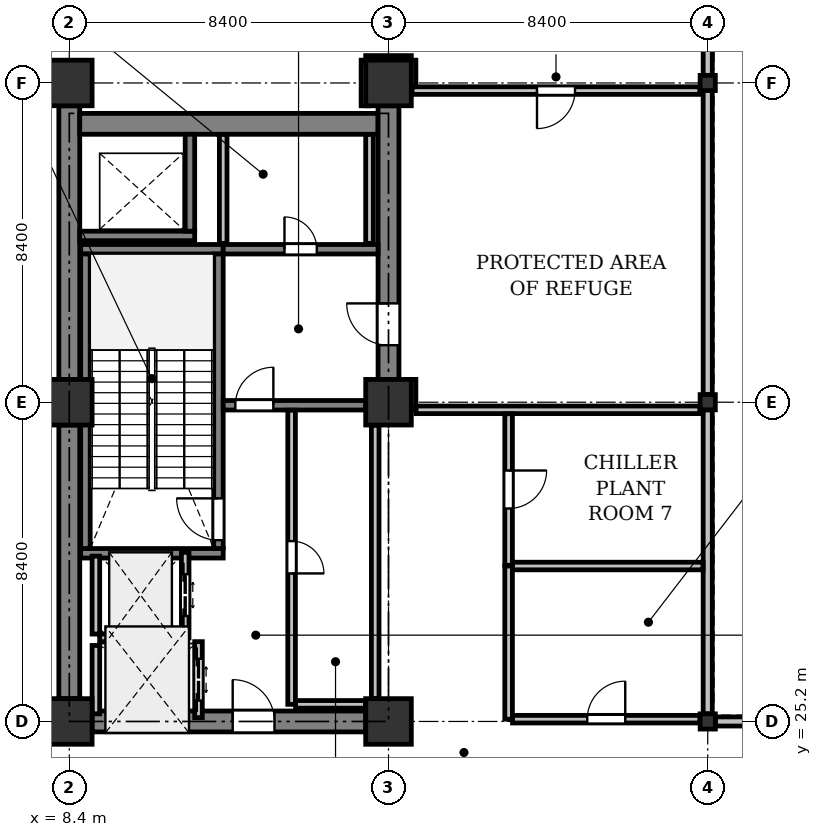
"""IFC4 building model, lengths in metres.
Left out: names, types, materials, properties, quantities, classifications, styles, units other than length and angle.
Written with IfcOpenShell. Run it as: python <this file> out.ifc"""

import sys

from ifc_helpers import new_model, si_unit, direction, frame, frame_2d, origin, origin_2d, place, context, subcontext, project, spatial, rectangle, i_section, extrude, element, fill, save


model = new_model("IFC4")
c1 = context("Model", 3, precision=1e-05, world=origin(), true_north=direction((0.0, 1.0)))
c2 = subcontext(c1, "Body", "Model", "MODEL_VIEW")
j1 = project(units=[si_unit("LENGTHUNIT", "METRE"), si_unit("PLANEANGLEUNIT", "RADIAN")], contexts=[c1])
p1 = place(None, origin())
s1 = spatial("IfcSite", under=j1, at=p1, CompositionType="ELEMENT")
p2 = place(p1, origin())
s2 = spatial("IfcBuilding", under=s1, at=p2, CompositionType="ELEMENT")
p3 = place(p2, frame((0.0, 0.0, 162.3)))
s3 = spatial("IfcBuildingStorey", under=s2, at=p3, CompositionType="ELEMENT", Elevation=162.3)
for number, where, z_axis, x_axis in (
    (1, (8.4, 25.2, 0.0), (0.0, 0.0, 1.0), (1.0, 0.0, 0.0)),
    (2, (8.4, 33.6, 0.0), (0.0, 0.0, 1.0), (1.0, 0.0, 0.0)),
    (3, (8.4, 42.0, 0.0), (0.0, 0.0, 1.0), (1.0, 0.0, 0.0)),
    (4, (16.8, 25.2, 0.0), (0.0, 0.0, 1.0), (1.0, 0.0, 0.0)),
    (5, (16.8, 33.6, 0.0), (0.0, 0.0, 1.0), (1.0, 0.0, 0.0)),
    (6, (16.8, 42.0, 0.0), (0.0, 0.0, 1.0), (1.0, 0.0, 0.0)),
):
    element("IfcColumn", number, at=place(p3, frame(where, z_axis=z_axis, x_axis=x_axis)), inside=s3, PredefinedType="COLUMN", context=c2, shape_type="SweptSolid", body=[
        extrude(rectangle(XDim=1.2, YDim=1.2, at=origin_2d()), origin(), (0.0, 0.0, 1.0), 5.0),
    ])
for number, where, z_axis, x_axis in (
    (7, (25.2, 25.2, 0.0), (0.0, 0.0, 1.0), (1.0, 0.0, 0.0)),
    (8, (25.2, 33.6, 0.0), (0.0, 0.0, 1.0), (1.0, 0.0, 0.0)),
    (9, (25.2, 42.0, 0.0), (0.0, 0.0, 1.0), (1.0, 0.0, 0.0)),
):
    element("IfcColumn", number, at=place(p3, frame(where, z_axis=z_axis, x_axis=x_axis)), inside=s3, PredefinedType="COLUMN", context=c2, shape_type="SweptSolid", body=[
        extrude(i_section(OverallWidth=0.4, OverallDepth=0.4, WebThickness=0.025, FlangeThickness=0.04, at=origin_2d()), origin(), (0.0, 0.0, 1.0), 5.0),
    ])
p4 = place(p3, frame((25.2, 46.08, 0.0), z_axis=(0.0, 0.0, 1.0), x_axis=(0.0, -1.0, 0.0)))
e10 = element("IfcWall", 10, at=p4, inside=s3, PredefinedType="STANDARD", context=c2, shape_type="SweptSolid", body=[
    extrude(rectangle(XDim=3.88, YDim=0.24, at=frame_2d((1.94, 0.0))), origin(), (0.0, 0.0, 1.0), 4.725),
])
for number, where, z_axis, x_axis in (
    (11, (25.2, 41.8, 0.0), (0.0, 0.0, 1.0), (0.0, -1.0, 0.0)),
    (12, (25.2, 33.4, 0.0), (0.0, 0.0, 1.0), (0.0, -1.0, 0.0)),
    (13, (25.4, 25.2, 0.0), (0.0, 0.0, 1.0), (1.0, 0.0, 0.0)),
):
    element("IfcWall", number, at=place(p3, frame(where, z_axis=z_axis, x_axis=x_axis)), inside=s3, PredefinedType="STANDARD", context=c2, shape_type="SweptSolid", body=[
        extrude(rectangle(XDim=8.0, YDim=0.24, at=frame_2d((4.0, 0.0))), origin(), (0.0, 0.0, 1.0), 4.425),
    ])
for number, where, z_axis, x_axis in (
    (14, (8.4, 25.8, 0.0), (0.0, 0.0, 1.0), (0.0, 1.0, 0.0)),
    (15, (8.4, 34.2, 0.0), (0.0, 0.0, 1.0), (0.0, 1.0, 0.0)),
):
    element("IfcWall", number, at=place(p3, frame(where, z_axis=z_axis, x_axis=x_axis)), inside=s3, PredefinedType="SHEAR", context=c2, shape_type="SweptSolid", body=[
        extrude(rectangle(XDim=7.2, YDim=0.55, at=frame_2d((3.6, 0.0))), origin(), (0.0, 0.0, 1.0), 4.725),
    ])
p5 = place(p3, frame((8.675, 40.925, 0.0), z_axis=(0.0, 0.0, 1.0), x_axis=(1.0, 0.0, 0.0)))
e16 = element("IfcWall", 16, at=p5, inside=s3, PredefinedType="SHEAR", context=c2, shape_type="SweptSolid", body=[
    extrude(rectangle(XDim=7.85, YDim=0.55, at=frame_2d((3.925, 0.0))), origin(), (0.0, 0.0, 1.0), 4.725),
])
p6 = place(p3, frame((16.8, 34.2, 0.0), z_axis=(0.0, 0.0, 1.0), x_axis=(0.0, 1.0, 0.0)))
e17 = element("IfcWall", 17, at=p6, inside=s3, PredefinedType="SHEAR", context=c2, shape_type="SweptSolid", body=[
    extrude(rectangle(XDim=7.2, YDim=0.55, at=frame_2d((3.6, 0.0))), origin(), (0.0, 0.0, 1.0), 4.725),
])
p7 = place(p6, frame((0.9, 0.0, 0.0)))
e18 = element("IfcOpeningElement", 18, at=p7, cuts=e17, PredefinedType="OPENING", context=c2, shape_type="SweptSolid", body=[
    extrude(rectangle(XDim=1.1, YDim=2.15, at=frame_2d((0.55, 1.075))), frame((0.0, 0.285, 0.0), z_axis=(0.0, -1.0, 0.0), x_axis=(1.0, 0.0, 0.0)), (0.0, 0.0, 1.0), 0.57),
])
p8 = place(p3, frame((9.0, 25.2, 0.0), z_axis=(0.0, 0.0, 1.0), x_axis=(1.0, 0.0, 0.0)))
e19 = element("IfcWall", 19, at=p8, inside=s3, PredefinedType="SHEAR", context=c2, shape_type="SweptSolid", body=[
    extrude(rectangle(XDim=7.2, YDim=0.55, at=frame_2d((3.6, 0.0))), origin(), (0.0, 0.0, 1.0), 4.725),
])
p9 = place(p8, frame((3.7, 0.0, 0.0)))
e20 = element("IfcOpeningElement", 20, at=p9, cuts=e19, PredefinedType="OPENING", context=c2, shape_type="SweptSolid", body=[
    extrude(rectangle(XDim=1.1, YDim=2.15, at=frame_2d((0.55, 1.075))), frame((0.0, 0.285, 0.0), z_axis=(0.0, -1.0, 0.0), x_axis=(1.0, 0.0, 0.0)), (0.0, 0.0, 1.0), 0.57),
])
for number, where, z_axis, x_axis in (
    (21, (12.45, 29.625, 0.0), (0.0, 0.0, 1.0), (-1.0, 0.0, 0.0)),
    (22, (12.45, 37.625, 0.0), (0.0, 0.0, 1.0), (-1.0, 0.0, 0.0)),
):
    element("IfcWall", number, at=place(p3, frame(where, z_axis=z_axis, x_axis=x_axis)), inside=s3, PredefinedType="SHEAR", context=c2, shape_type="SweptSolid", body=[
        extrude(rectangle(XDim=3.75, YDim=0.25, at=frame_2d((1.875, 0.0))), origin(), (0.0, 0.0, 1.0), 4.725),
    ])
p10 = place(p3, frame((12.325, 29.75, 0.0), z_axis=(0.0, 0.0, 1.0), x_axis=(0.0, 1.0, 0.0)))
e23 = element("IfcWall", 23, at=p10, inside=s3, PredefinedType="SHEAR", context=c2, shape_type="SweptSolid", body=[
    extrude(rectangle(XDim=7.75, YDim=0.25, at=frame_2d((3.875, 0.0))), origin(), (0.0, 0.0, 1.0), 4.725),
])
p11 = place(p10, frame((0.22, 0.0, 0.0)))
e24 = element("IfcOpeningElement", 24, at=p11, cuts=e23, PredefinedType="OPENING", context=c2, shape_type="SweptSolid", body=[
    extrude(rectangle(XDim=1.1, YDim=2.15, at=frame_2d((0.55, 1.075))), frame((0.0, 0.135, 0.0), z_axis=(0.0, -1.0, 0.0), x_axis=(1.0, 0.0, 0.0)), (0.0, 0.0, 1.0), 0.27),
])
p12 = place(p3, frame((8.825, 29.75, 0.0), z_axis=(0.0, 0.0, 1.0), x_axis=(0.0, 1.0, 0.0)))
e25 = element("IfcWall", 25, at=p12, inside=s3, PredefinedType="SHEAR", context=c2, shape_type="SweptSolid", body=[
    extrude(rectangle(XDim=7.75, YDim=0.25, at=frame_2d((3.875, 0.0))), origin(), (0.0, 0.0, 1.0), 4.725),
])
p13 = place(p3, frame((8.675, 37.975, 0.0), z_axis=(0.0, 0.0, 1.0), x_axis=(1.0, 0.0, 0.0)))
e26 = element("IfcWall", 26, at=p13, inside=s3, PredefinedType="SHEAR", context=c2, shape_type="SweptSolid", body=[
    extrude(rectangle(XDim=3.025, YDim=0.25, at=frame_2d((1.512, 0.0))), origin(), (0.0, 0.0, 1.0), 4.725),
])
p14 = place(p3, frame((11.575, 38.1, 0.0), z_axis=(0.0, 0.0, 1.0), x_axis=(0.0, 1.0, 0.0)))
e27 = element("IfcWall", 27, at=p14, inside=s3, PredefinedType="SHEAR", context=c2, shape_type="SweptSolid", body=[
    extrude(rectangle(XDim=2.55, YDim=0.25, at=frame_2d((1.275, 0.0))), origin(), (0.0, 0.0, 1.0), 4.725),
])
p15 = place(p3, frame((12.45, 33.52, 0.0), z_axis=(0.0, 0.0, 1.0), x_axis=(1.0, 0.0, 0.0)))
e28 = element("IfcWall", 28, at=p15, inside=s3, PredefinedType="SHEAR", context=c2, shape_type="SweptSolid", body=[
    extrude(rectangle(XDim=3.75, YDim=0.25, at=frame_2d((1.875, 0.0))), origin(), (0.0, 0.0, 1.0), 4.725),
])
p16 = place(p15, frame((0.32, 0.0, 0.0)))
e29 = element("IfcOpeningElement", 29, at=p16, cuts=e28, PredefinedType="OPENING", context=c2, shape_type="SweptSolid", body=[
    extrude(rectangle(XDim=1.0, YDim=2.15, at=frame_2d((0.5, 1.075))), frame((0.0, 0.135, 0.0), z_axis=(0.0, -1.0, 0.0), x_axis=(1.0, 0.0, 0.0)), (0.0, 0.0, 1.0), 0.27),
])
p17 = place(p3, frame((12.45, 37.625, 0.0), z_axis=(0.0, 0.0, 1.0), x_axis=(1.0, 0.0, 0.0)))
e30 = element("IfcWall", 30, at=p17, inside=s3, PredefinedType="SHEAR", context=c2, shape_type="SweptSolid", body=[
    extrude(rectangle(XDim=4.075, YDim=0.25, at=frame_2d((2.038, 0.0))), origin(), (0.0, 0.0, 1.0), 4.725),
])
p18 = place(p17, frame((1.613, 0.0, 0.0)))
e31 = element("IfcOpeningElement", 31, at=p18, cuts=e30, PredefinedType="OPENING", context=c2, shape_type="SweptSolid", body=[
    extrude(rectangle(XDim=0.85, YDim=2.15, at=frame_2d((0.425, 1.075))), frame((0.0, 0.135, 0.0), z_axis=(0.0, -1.0, 0.0), x_axis=(1.0, 0.0, 0.0)), (0.0, 0.0, 1.0), 0.27),
])
p19 = place(p3, frame((11.45, 27.4, 0.0), z_axis=(0.0, 0.0, 1.0), x_axis=(0.0, 1.0, 0.0)))
e32 = element("IfcWall", 32, at=p19, inside=s3, PredefinedType="PARTITIONING", context=c2, shape_type="SweptSolid", body=[
    extrude(rectangle(XDim=2.25, YDim=0.2, at=frame_2d((1.125, 0.0))), origin(), (0.0, 0.0, 1.0), 4.725),
])
p20 = place(p19, frame((0.575, 0.0, 0.0)))
e33 = element("IfcOpeningElement", 33, at=p20, cuts=e32, PredefinedType="OPENING", context=c2, shape_type="SweptSolid", body=[
    extrude(rectangle(XDim=1.1, YDim=2.2, at=frame_2d((0.55, 1.1))), frame((0.0, 0.11, 0.0), z_axis=(0.0, -1.0, 0.0), x_axis=(1.0, 0.0, 0.0)), (0.0, 0.0, 1.0), 0.22),
])
p21 = place(p3, frame((9.1, 27.5, 0.0), z_axis=(0.0, 0.0, 1.0), x_axis=(0.0, 1.0, 0.0)))
e34 = element("IfcWall", 34, at=p21, inside=s3, PredefinedType="PARTITIONING", context=c2, shape_type="SweptSolid", body=[
    extrude(rectangle(XDim=2.05, YDim=0.2, at=frame_2d((1.025, 0.0))), origin(), (0.0, 0.0, 1.0), 4.725),
])
p22 = place(p3, frame((9.2, 27.4, 0.0), z_axis=(0.0, 0.0, 1.0), x_axis=(1.0, 0.0, 0.0)))
e35 = element("IfcWall", 35, at=p22, inside=s3, PredefinedType="PARTITIONING", context=c2, shape_type="SweptSolid", body=[
    extrude(rectangle(XDim=2.15, YDim=0.2, at=frame_2d((1.075, 0.0))), origin(), (0.0, 0.0, 1.0), 4.725),
])
p23 = place(p3, frame((11.8, 25.3, 0.0), z_axis=(0.0, 0.0, 1.0), x_axis=(0.0, 1.0, 0.0)))
e36 = element("IfcWall", 36, at=p23, inside=s3, PredefinedType="PARTITIONING", context=c2, shape_type="SweptSolid", body=[
    extrude(rectangle(XDim=2.0, YDim=0.2, at=frame_2d((1.0, 0.0))), origin(), (0.0, 0.0, 1.0), 4.725),
])
p24 = place(p23, frame((0.45, 0.0, 0.0)))
e37 = element("IfcOpeningElement", 37, at=p24, cuts=e36, PredefinedType="OPENING", context=c2, shape_type="SweptSolid", body=[
    extrude(rectangle(XDim=1.1, YDim=2.2, at=frame_2d((0.55, 1.1))), frame((0.0, 0.11, 0.0), z_axis=(0.0, -1.0, 0.0), x_axis=(1.0, 0.0, 0.0)), (0.0, 0.0, 1.0), 0.22),
])
p25 = place(p3, frame((9.1, 25.4, 0.0), z_axis=(0.0, 0.0, 1.0), x_axis=(0.0, 1.0, 0.0)))
e38 = element("IfcWall", 38, at=p25, inside=s3, PredefinedType="PARTITIONING", context=c2, shape_type="SweptSolid", body=[
    extrude(rectangle(XDim=1.8, YDim=0.2, at=frame_2d((0.9, 0.0))), origin(), (0.0, 0.0, 1.0), 4.725),
])
p26 = place(p3, frame((16.45, 25.805, 0.0), z_axis=(0.0, 0.0, 1.0), x_axis=(0.0, 1.0, 0.0)))
e39 = element("IfcWall", 39, at=p26, inside=s3, PredefinedType="PARTITIONING", context=c2, shape_type="SweptSolid", body=[
    extrude(rectangle(XDim=7.19, YDim=0.2, at=frame_2d((3.595, 0.0))), origin(), (0.0, 0.0, 1.0), 4.725),
])
p27 = place(p3, frame((14.25, 33.39, 0.0), z_axis=(0.0, 0.0, 1.0), x_axis=(0.0, -1.0, 0.0)))
e40 = element("IfcWall", 40, at=p27, inside=s3, PredefinedType="PARTITIONING", context=c2, shape_type="SweptSolid", body=[
    extrude(rectangle(XDim=7.74, YDim=0.2, at=frame_2d((3.87, 0.0))), origin(), (0.0, 0.0, 1.0), 4.725),
])
p28 = place(p27, frame((3.445, 0.0, 0.0)))
e41 = element("IfcOpeningElement", 41, at=p28, cuts=e40, PredefinedType="OPENING", context=c2, shape_type="SweptSolid", body=[
    extrude(rectangle(XDim=0.85, YDim=2.15, at=frame_2d((0.425, 1.075))), frame((0.0, 0.11, 0.0), z_axis=(0.0, -1.0, 0.0), x_axis=(1.0, 0.0, 0.0)), (0.0, 0.0, 1.0), 0.22),
])
p29 = place(p3, frame((14.354, 25.65, 0.0), z_axis=(0.0, 0.0, 1.0), x_axis=(1.0, 0.0, 0.0)))
e42 = element("IfcWall", 42, at=p29, inside=s3, PredefinedType="PARTITIONING", context=c2, shape_type="SweptSolid", body=[
    extrude(rectangle(XDim=1.841, YDim=0.2, at=frame_2d((0.92, 0.0))), origin(), (0.0, 0.0, 1.0), 4.725),
])
for number, where, z_axis, x_axis in (
    (43, (16.3, 37.78, 0.0), (0.0, 0.0, 1.0), (0.0, 1.0, 0.0)),
    (44, (12.45, 40.646, 0.0), (0.0, 0.0, 1.0), (0.0, -1.0, 0.0)),
):
    element("IfcWall", number, at=place(p3, frame(where, z_axis=z_axis, x_axis=x_axis)), inside=s3, PredefinedType="PARTITIONING", context=c2, shape_type="SweptSolid", body=[
        extrude(rectangle(XDim=2.866, YDim=0.2, at=frame_2d((1.433, 0.0))), origin(), (0.0, 0.0, 1.0), 3.625),
    ])
p30 = place(p3, frame((17.42, 34.2, 0.0), z_axis=(0.0, 0.0, 1.0), x_axis=(0.0, -1.0, 0.0)))
e45 = element("IfcWall", 45, at=p30, inside=s3, PredefinedType="PARTITIONING", context=c2, shape_type="SweptSolid", body=[
    extrude(rectangle(XDim=0.8, YDim=0.2, at=frame_2d((0.4, 0.0))), origin(), (0.0, 0.0, 1.0), 3.825),
])
p31 = place(p3, frame((17.524, 33.4, 0.0), z_axis=(0.0, 0.0, 1.0), x_axis=(1.0, 0.0, 0.0)))
e46 = element("IfcWall", 46, at=p31, inside=s3, PredefinedType="PARTITIONING", context=c2, shape_type="SweptSolid", body=[
    extrude(rectangle(XDim=7.471, YDim=0.2, at=frame_2d((3.736, 0.0))), origin(), (0.0, 0.0, 1.0), 3.825),
])
p32 = place(p3, frame((24.995, 41.8, 0.0), z_axis=(0.0, 0.0, 1.0), x_axis=(-1.0, 0.0, 0.0)))
e47 = element("IfcWall", 47, at=p32, inside=s3, PredefinedType="PARTITIONING", context=c2, shape_type="SweptSolid", body=[
    extrude(rectangle(XDim=7.575, YDim=0.2, at=frame_2d((3.788, 0.0))), origin(), (0.0, 0.0, 1.0), 3.825),
])
p33 = place(p32, frame((3.288, 0.0, 0.0)))
e48 = element("IfcOpeningElement", 48, at=p33, cuts=e47, PredefinedType="OPENING", context=c2, shape_type="SweptSolid", body=[
    extrude(rectangle(XDim=1.0, YDim=2.15, at=frame_2d((0.5, 1.075))), frame((0.0, 0.11, 0.0), z_axis=(0.0, -1.0, 0.0), x_axis=(1.0, 0.0, 0.0)), (0.0, 0.0, 1.0), 0.22),
])
p34 = place(p3, frame((16.18, 41.4, 0.0), z_axis=(0.0, 0.0, 1.0), x_axis=(0.0, 1.0, 0.0)))
e49 = element("IfcWall", 49, at=p34, inside=s3, PredefinedType="PARTITIONING", context=c2, shape_type="SweptSolid", body=[
    extrude(rectangle(XDim=1.2, YDim=0.2, at=frame_2d((0.6, 0.0))), origin(), (0.0, 0.0, 1.0), 3.825),
])
p35 = place(p3, frame((16.2, 42.62, 0.0), z_axis=(0.0, 0.0, 1.0), x_axis=(1.0, 0.0, 0.0)))
e50 = element("IfcWall", 50, at=p35, inside=s3, PredefinedType="PARTITIONING", context=c2, shape_type="SweptSolid", body=[
    extrude(rectangle(XDim=1.2, YDim=0.2, at=frame_2d((0.6, 0.0))), origin(), (0.0, 0.0, 1.0), 3.709),
])
p36 = place(p3, frame((17.42, 42.6, 0.0), z_axis=(0.0, 0.0, 1.0), x_axis=(0.0, -1.0, 0.0)))
e51 = element("IfcWall", 51, at=p36, inside=s3, PredefinedType="PARTITIONING", context=c2, shape_type="SweptSolid", body=[
    extrude(rectangle(XDim=0.696, YDim=0.2, at=frame_2d((0.348, 0.0))), origin(), (0.0, 0.0, 1.0), 3.825),
])
p37 = place(p3, frame((19.96, 29.29, 0.0), z_axis=(0.0, 0.0, 1.0), x_axis=(0.0, -1.0, 0.0)))
e52 = element("IfcWall", 52, at=p37, inside=s3, PredefinedType="PARTITIONING", context=c2, shape_type="SweptSolid", body=[
    extrude(rectangle(XDim=4.03, YDim=0.2, at=frame_2d((2.015, 0.0))), origin(), (0.0, 0.0, 1.0), 3.825),
])
p38 = place(p3, frame((20.064, 25.26, 0.0), z_axis=(0.0, 0.0, 1.0), x_axis=(1.0, 0.0, 0.0)))
e53 = element("IfcWall", 53, at=p38, inside=s3, PredefinedType="PARTITIONING", context=c2, shape_type="SweptSolid", body=[
    extrude(rectangle(XDim=4.931, YDim=0.2, at=frame_2d((2.466, 0.0))), origin(), (0.0, 0.0, 1.0), 3.825),
])
p39 = place(p38, frame((1.966, 0.0, 0.0)))
e54 = element("IfcOpeningElement", 54, at=p39, cuts=e53, PredefinedType="OPENING", context=c2, shape_type="SweptSolid", body=[
    extrude(rectangle(XDim=1.0, YDim=2.15, at=frame_2d((0.5, 1.075))), frame((0.0, 0.11, 0.0), z_axis=(0.0, -1.0, 0.0), x_axis=(1.0, 0.0, 0.0)), (0.0, 0.0, 1.0), 0.22),
])
p40 = place(p3, frame((25.076, 29.29, 0.0), z_axis=(0.0, 0.0, 1.0), x_axis=(-1.0, 0.0, 0.0)))
e55 = element("IfcWall", 55, at=p40, inside=s3, PredefinedType="PARTITIONING", context=c2, shape_type="SweptSolid", body=[
    extrude(rectangle(XDim=5.012, YDim=0.2, at=frame_2d((2.506, 0.0))), origin(), (0.0, 0.0, 1.0), 4.322),
])
p41 = place(p3, frame((19.96, 33.296, 0.0), z_axis=(0.0, 0.0, 1.0), x_axis=(0.0, -1.0, 0.0)))
e56 = element("IfcWall", 56, at=p41, inside=s3, PredefinedType="PARTITIONING", context=c2, shape_type="SweptSolid", body=[
    extrude(rectangle(XDim=3.986, YDim=0.2, at=frame_2d((1.993, 0.0))), origin(), (0.0, 0.0, 1.0), 4.725),
])
p42 = place(p41, frame((1.493, 0.0, 0.0)))
e57 = element("IfcOpeningElement", 57, at=p42, cuts=e56, PredefinedType="OPENING", context=c2, shape_type="SweptSolid", body=[
    extrude(rectangle(XDim=1.0, YDim=2.15, at=frame_2d((0.5, 1.075))), frame((0.0, 0.11, 0.0), z_axis=(0.0, -1.0, 0.0), x_axis=(1.0, 0.0, 0.0)), (0.0, 0.0, 1.0), 0.22),
])
p43 = place(p7, origin())
e58 = element("IfcDoor", 58, at=p43, inside=s3, OperationType="SINGLE_SWING_RIGHT", PredefinedType="DOOR", context=c2, shape_type="SweptSolid", body=[
    extrude(rectangle(XDim=1.1, YDim=2.15, at=frame_2d((0.55, 1.075))), frame((0.0, 0.025, 0.0), z_axis=(0.0, -1.0, 0.0), x_axis=(1.0, 0.0, 0.0)), (0.0, 0.0, 1.0), 0.05),
])
fill(e18, e58)
p44 = place(p9, origin())
e59 = element("IfcDoor", 59, at=p44, inside=s3, OperationType="SINGLE_SWING_LEFT", PredefinedType="DOOR", context=c2, shape_type="SweptSolid", body=[
    extrude(rectangle(XDim=1.1, YDim=2.15, at=frame_2d((0.55, 1.075))), frame((0.0, 0.025, 0.0), z_axis=(0.0, -1.0, 0.0), x_axis=(1.0, 0.0, 0.0)), (0.0, 0.0, 1.0), 0.05),
])
fill(e20, e59)
p45 = place(p11, origin())
e60 = element("IfcDoor", 60, at=p45, inside=s3, OperationType="SINGLE_SWING_RIGHT", PredefinedType="DOOR", context=c2, shape_type="SweptSolid", body=[
    extrude(rectangle(XDim=1.1, YDim=2.15, at=frame_2d((0.55, 1.075))), frame((0.0, 0.025, 0.0), z_axis=(0.0, -1.0, 0.0), x_axis=(1.0, 0.0, 0.0)), (0.0, 0.0, 1.0), 0.05),
])
fill(e24, e60)
p46 = place(p16, origin())
e61 = element("IfcDoor", 61, at=p46, inside=s3, OperationType="SINGLE_SWING_RIGHT", PredefinedType="DOOR", context=c2, shape_type="SweptSolid", body=[
    extrude(rectangle(XDim=1.0, YDim=2.15, at=frame_2d((0.5, 1.075))), frame((0.0, 0.025, 0.0), z_axis=(0.0, -1.0, 0.0), x_axis=(1.0, 0.0, 0.0)), (0.0, 0.0, 1.0), 0.05),
])
fill(e29, e61)
p47 = place(p20, origin())
e62 = element("IfcDoor", 62, at=p47, inside=s3, OperationType="DOUBLE_DOOR_SLIDING", PredefinedType="DOOR", context=c2, shape_type="SweptSolid", body=[
    extrude(rectangle(XDim=1.1, YDim=2.2, at=frame_2d((0.55, 1.1))), frame((0.0, 0.025, 0.0), z_axis=(0.0, -1.0, 0.0), x_axis=(1.0, 0.0, 0.0)), (0.0, 0.0, 1.0), 0.05),
])
fill(e33, e62)
p48 = place(p24, origin())
e63 = element("IfcDoor", 63, at=p48, inside=s3, OperationType="DOUBLE_DOOR_SLIDING", PredefinedType="DOOR", context=c2, shape_type="SweptSolid", body=[
    extrude(rectangle(XDim=1.1, YDim=2.2, at=frame_2d((0.55, 1.1))), frame((0.0, 0.025, 0.0), z_axis=(0.0, -1.0, 0.0), x_axis=(1.0, 0.0, 0.0)), (0.0, 0.0, 1.0), 0.05),
])
fill(e37, e63)
p49 = place(p28, origin())
e64 = element("IfcDoor", 64, at=p49, inside=s3, OperationType="SINGLE_SWING_RIGHT", PredefinedType="DOOR", context=c2, shape_type="SweptSolid", body=[
    extrude(rectangle(XDim=0.85, YDim=2.15, at=frame_2d((0.425, 1.075))), frame((0.0, 0.025, 0.0), z_axis=(0.0, -1.0, 0.0), x_axis=(1.0, 0.0, 0.0)), (0.0, 0.0, 1.0), 0.05),
])
fill(e41, e64)
p50 = place(p18, origin())
e65 = element("IfcDoor", 65, at=p50, inside=s3, OperationType="SINGLE_SWING_LEFT", PredefinedType="DOOR", context=c2, shape_type="SweptSolid", body=[
    extrude(rectangle(XDim=0.85, YDim=2.15, at=frame_2d((0.425, 1.075))), frame((0.0, 0.025, 0.0), z_axis=(0.0, -1.0, 0.0), x_axis=(1.0, 0.0, 0.0)), (0.0, 0.0, 1.0), 0.05),
])
fill(e31, e65)
p51 = place(p33, origin())
e66 = element("IfcDoor", 66, at=p51, inside=s3, OperationType="SINGLE_SWING_RIGHT", PredefinedType="DOOR", context=c2, shape_type="SweptSolid", body=[
    extrude(rectangle(XDim=1.0, YDim=2.15, at=frame_2d((0.5, 1.075))), frame((0.0, 0.025, 0.0), z_axis=(0.0, -1.0, 0.0), x_axis=(1.0, 0.0, 0.0)), (0.0, 0.0, 1.0), 0.05),
])
fill(e48, e66)
p52 = place(p39, origin())
e67 = element("IfcDoor", 67, at=p52, inside=s3, OperationType="SINGLE_SWING_RIGHT", PredefinedType="DOOR", context=c2, shape_type="SweptSolid", body=[
    extrude(rectangle(XDim=1.0, YDim=2.15, at=frame_2d((0.5, 1.075))), frame((0.0, 0.025, 0.0), z_axis=(0.0, -1.0, 0.0), x_axis=(1.0, 0.0, 0.0)), (0.0, 0.0, 1.0), 0.05),
])
fill(e54, e67)
p53 = place(p42, origin())
e68 = element("IfcDoor", 68, at=p53, inside=s3, OperationType="SINGLE_SWING_LEFT", PredefinedType="DOOR", context=c2, shape_type="SweptSolid", body=[
    extrude(rectangle(XDim=1.0, YDim=2.15, at=frame_2d((0.5, 1.075))), frame((0.0, 0.025, 0.0), z_axis=(0.0, -1.0, 0.0), x_axis=(1.0, 0.0, 0.0)), (0.0, 0.0, 1.0), 0.05),
])
fill(e57, e68)
save(model, sys.argv[1])
